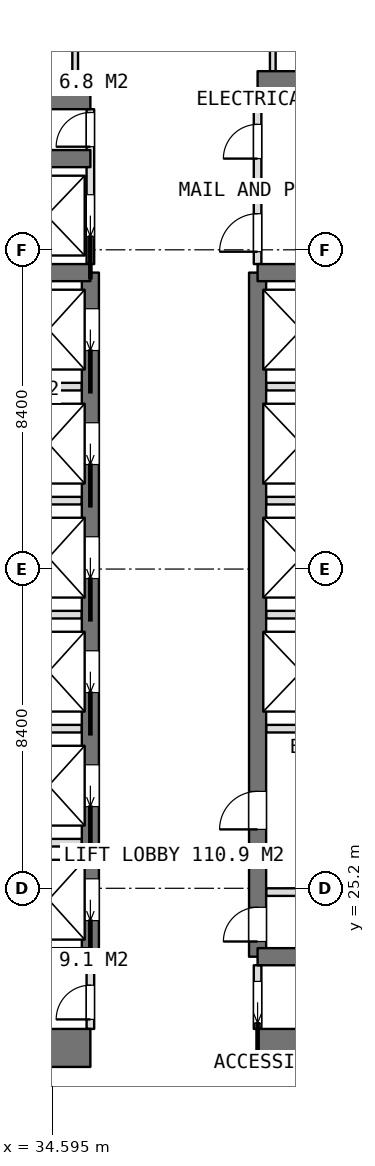
"""IFC4 building model, lengths in metres.
Left out: names, types, materials, properties, quantities, classifications, styles, units other than length and angle.
Written with IfcOpenShell. Run it as: python <this file> out.ifc"""

import sys

from ifc_helpers import new_model, si_unit, direction, frame, frame_2d, origin, place, context, subcontext, project, spatial, rectangle, extrude, element, fill, save


model = new_model("IFC4")
c1 = context("Model", 3, precision=1e-05, world=origin(), true_north=direction((0.0, 1.0)))
c2 = subcontext(c1, "Body", "Model", "MODEL_VIEW")
j1 = project(units=[si_unit("LENGTHUNIT", "METRE"), si_unit("PLANEANGLEUNIT", "RADIAN")], contexts=[c1])
p1 = place(None, origin())
s1 = spatial("IfcSite", under=j1, at=p1, CompositionType="ELEMENT")
p2 = place(p1, origin())
s2 = spatial("IfcBuilding", under=s1, at=p2, CompositionType="ELEMENT")
p3 = place(p2, frame((0.0, 0.0, 117.8)))
s3 = spatial("IfcBuildingStorey", under=s2, at=p3, CompositionType="ELEMENT", Elevation=117.8)
p4 = place(p3, frame((25.2, 21.0, 0.0), z_axis=(0.0, 0.0, 1.0), x_axis=(1.0, 0.0, 0.0)))
e1 = element("IfcWall", 1, at=p4, inside=s3, PredefinedType="SHEAR", context=c2, shape_type="SweptSolid", body=[
    extrude(rectangle(XDim=10.4, YDim=1.0, at=frame_2d((5.2, 0.0))), origin(), (0.0, 0.0, 1.0), 3.75),
])
p5 = place(p3, frame((40.0, 21.0, 0.0), z_axis=(0.0, 0.0, 1.0), x_axis=(1.0, 0.0, 0.0)))
e2 = element("IfcWall", 2, at=p5, inside=s3, PredefinedType="SHEAR", context=c2, shape_type="SweptSolid", body=[
    extrude(rectangle(XDim=10.4, YDim=1.0, at=frame_2d((5.2, 0.0))), origin(), (0.0, 0.0, 1.0), 3.75),
])
p6 = place(p3, frame((25.2, 46.2, 0.0), z_axis=(0.0, 0.0, 1.0), x_axis=(1.0, 0.0, 0.0)))
e3 = element("IfcWall", 3, at=p6, inside=s3, PredefinedType="SHEAR", context=c2, shape_type="SweptSolid", body=[
    extrude(rectangle(XDim=10.4, YDim=1.0, at=frame_2d((5.2, 0.0))), origin(), (0.0, 0.0, 1.0), 3.75),
])
p7 = place(p3, frame((40.0, 46.2, 0.0), z_axis=(0.0, 0.0, 1.0), x_axis=(1.0, 0.0, 0.0)))
e4 = element("IfcWall", 4, at=p7, inside=s3, PredefinedType="SHEAR", context=c2, shape_type="SweptSolid", body=[
    extrude(rectangle(XDim=10.4, YDim=1.0, at=frame_2d((5.2, 0.0))), origin(), (0.0, 0.0, 1.0), 3.75),
])
p8 = place(p3, frame((35.6, 23.4, 0.0), z_axis=(0.0, 0.0, 1.0), x_axis=(0.0, 1.0, 0.0)))
e5 = element("IfcWall", 5, at=p8, inside=s3, PredefinedType="SHEAR", context=c2, shape_type="SweptSolid", body=[
    extrude(rectangle(XDim=18.0, YDim=0.45, at=frame_2d((9.0, 0.0))), origin(), (0.0, 0.0, 1.0), 3.75),
])
p9 = place(p8, frame((0.95, 0.0, 0.0)))
e6 = element("IfcOpeningElement", 6, at=p9, cuts=e5, PredefinedType="OPENING", context=c2, shape_type="SweptSolid", body=[
    extrude(rectangle(XDim=1.1, YDim=2.1, at=frame_2d((0.55, 1.05))), frame((0.0, 0.235, 0.0), z_axis=(0.0, -1.0, 0.0), x_axis=(1.0, 0.0, 0.0)), (0.0, 0.0, 1.0), 0.47),
])
p10 = place(p8, frame((3.95, 0.0, 0.0)))
e7 = element("IfcOpeningElement", 7, at=p10, cuts=e5, PredefinedType="OPENING", context=c2, shape_type="SweptSolid", body=[
    extrude(rectangle(XDim=1.1, YDim=2.1, at=frame_2d((0.55, 1.05))), frame((0.0, 0.235, 0.0), z_axis=(0.0, -1.0, 0.0), x_axis=(1.0, 0.0, 0.0)), (0.0, 0.0, 1.0), 0.47),
])
p11 = place(p8, frame((6.95, 0.0, 0.0)))
e8 = element("IfcOpeningElement", 8, at=p11, cuts=e5, PredefinedType="OPENING", context=c2, shape_type="SweptSolid", body=[
    extrude(rectangle(XDim=1.1, YDim=2.1, at=frame_2d((0.55, 1.05))), frame((0.0, 0.235, 0.0), z_axis=(0.0, -1.0, 0.0), x_axis=(1.0, 0.0, 0.0)), (0.0, 0.0, 1.0), 0.47),
])
p12 = place(p8, frame((9.95, 0.0, 0.0)))
e9 = element("IfcOpeningElement", 9, at=p12, cuts=e5, PredefinedType="OPENING", context=c2, shape_type="SweptSolid", body=[
    extrude(rectangle(XDim=1.1, YDim=2.1, at=frame_2d((0.55, 1.05))), frame((0.0, 0.235, 0.0), z_axis=(0.0, -1.0, 0.0), x_axis=(1.0, 0.0, 0.0)), (0.0, 0.0, 1.0), 0.47),
])
p13 = place(p8, frame((12.95, 0.0, 0.0)))
e10 = element("IfcOpeningElement", 10, at=p13, cuts=e5, PredefinedType="OPENING", context=c2, shape_type="SweptSolid", body=[
    extrude(rectangle(XDim=1.1, YDim=2.1, at=frame_2d((0.55, 1.05))), frame((0.0, 0.235, 0.0), z_axis=(0.0, -1.0, 0.0), x_axis=(1.0, 0.0, 0.0)), (0.0, 0.0, 1.0), 0.47),
])
p14 = place(p8, frame((15.95, 0.0, 0.0)))
e11 = element("IfcOpeningElement", 11, at=p14, cuts=e5, PredefinedType="OPENING", context=c2, shape_type="SweptSolid", body=[
    extrude(rectangle(XDim=1.1, YDim=2.1, at=frame_2d((0.55, 1.05))), frame((0.0, 0.235, 0.0), z_axis=(0.0, -1.0, 0.0), x_axis=(1.0, 0.0, 0.0)), (0.0, 0.0, 1.0), 0.47),
])
p15 = place(p3, frame((40.0, 23.4, 0.0), z_axis=(0.0, 0.0, 1.0), x_axis=(0.0, 1.0, 0.0)))
e12 = element("IfcWall", 12, at=p15, inside=s3, PredefinedType="SHEAR", context=c2, shape_type="SweptSolid", body=[
    extrude(rectangle(XDim=18.0, YDim=0.45, at=frame_2d((9.0, 0.0))), origin(), (0.0, 0.0, 1.0), 3.75),
])
p16 = place(p15, frame((0.4, 0.0, 0.0)))
e13 = element("IfcOpeningElement", 13, at=p16, cuts=e12, PredefinedType="OPENING", context=c2, shape_type="SweptSolid", body=[
    extrude(rectangle(XDim=0.9, YDim=2.1, at=frame_2d((0.45, 1.05))), frame((0.0, 0.235, 0.0), z_axis=(0.0, -1.0, 0.0), x_axis=(1.0, 0.0, 0.0)), (0.0, 0.0, 1.0), 0.47),
])
p17 = place(p15, frame((3.35, 0.0, 0.0)))
e14 = element("IfcOpeningElement", 14, at=p17, cuts=e12, PredefinedType="OPENING", context=c2, shape_type="SweptSolid", body=[
    extrude(rectangle(XDim=1.0, YDim=2.1, at=frame_2d((0.5, 1.05))), frame((0.0, 0.235, 0.0), z_axis=(0.0, -1.0, 0.0), x_axis=(1.0, 0.0, 0.0)), (0.0, 0.0, 1.0), 0.47),
])
for number, where, z_axis, x_axis in (
    (15, (31.8, 23.4, 0.0), (0.0, 0.0, 1.0), (1.0, 0.0, 0.0)),
    (16, (31.8, 41.4, 0.0), (0.0, 0.0, 1.0), (1.0, 0.0, 0.0)),
    (17, (31.8, 44.4, 0.0), (0.0, 0.0, 1.0), (1.0, 0.0, 0.0)),
    (18, (40.0, 23.4, 0.0), (0.0, 0.0, 1.0), (1.0, 0.0, 0.0)),
    (19, (40.0, 41.4, 0.0), (0.0, 0.0, 1.0), (1.0, 0.0, 0.0)),
):
    element("IfcWall", number, at=place(p3, frame(where, z_axis=z_axis, x_axis=x_axis)), inside=s3, PredefinedType="SHEAR", context=c2, shape_type="SweptSolid", body=[
        extrude(rectangle(XDim=3.8, YDim=0.45, at=frame_2d((1.9, 0.0))), origin(), (0.0, 0.0, 1.0), 3.75),
    ])
for number, where, z_axis, x_axis in (
    (20, (32.025, 26.4, 0.0), (0.0, 0.0, 1.0), (1.0, 0.0, 0.0)),
    (21, (32.025, 29.4, 0.0), (0.0, 0.0, 1.0), (1.0, 0.0, 0.0)),
    (22, (32.025, 32.4, 0.0), (0.0, 0.0, 1.0), (1.0, 0.0, 0.0)),
    (23, (32.025, 35.4, 0.0), (0.0, 0.0, 1.0), (1.0, 0.0, 0.0)),
    (24, (32.025, 38.4, 0.0), (0.0, 0.0, 1.0), (1.0, 0.0, 0.0)),
):
    element("IfcWall", number, at=place(p3, frame(where, z_axis=z_axis, x_axis=x_axis)), inside=s3, PredefinedType="PARTITIONING", context=c2, shape_type="SweptSolid", body=[
        extrude(rectangle(XDim=3.35, YDim=0.2, at=frame_2d((1.675, 0.0))), origin(), (0.0, 0.0, 1.0), 3.5),
    ])
for number, where, z_axis, x_axis in (
    (25, (40.225, 29.4, 0.0), (0.0, 0.0, 1.0), (1.0, 0.0, 0.0)),
    (26, (40.225, 32.4, 0.0), (0.0, 0.0, 1.0), (1.0, 0.0, 0.0)),
    (27, (40.225, 35.4, 0.0), (0.0, 0.0, 1.0), (1.0, 0.0, 0.0)),
    (28, (40.225, 38.4, 0.0), (0.0, 0.0, 1.0), (1.0, 0.0, 0.0)),
):
    element("IfcWall", number, at=place(p3, frame(where, z_axis=z_axis, x_axis=x_axis)), inside=s3, PredefinedType="PARTITIONING", context=c2, shape_type="SweptSolid", body=[
        extrude(rectangle(XDim=3.35, YDim=0.2, at=frame_2d((1.675, 0.0))), origin(), (0.0, 0.0, 1.0), 3.5),
    ])
p18 = place(p3, frame((40.0, 21.5, 0.0), z_axis=(0.0, 0.0, 1.0), x_axis=(0.0, 1.0, 0.0)))
e29 = element("IfcWall", 29, at=p18, inside=s3, PredefinedType="PARTITIONING", context=c2, shape_type="SweptSolid", body=[
    extrude(rectangle(XDim=1.675, YDim=0.2, at=frame_2d((0.837, 0.0))), origin(), (0.0, 0.0, 1.0), 3.5),
])
p19 = place(p18, frame((0.15, 0.0, 0.0)))
e30 = element("IfcOpeningElement", 30, at=p19, cuts=e29, PredefinedType="OPENING", context=c2, shape_type="SweptSolid", body=[
    extrude(rectangle(XDim=1.1, YDim=2.1, at=frame_2d((0.55, 1.05))), frame((0.0, 0.11, 0.0), z_axis=(0.0, -1.0, 0.0), x_axis=(1.0, 0.0, 0.0)), (0.0, 0.0, 1.0), 0.22),
])
p20 = place(p3, frame((40.0, 41.625, 0.0), z_axis=(0.0, 0.0, 1.0), x_axis=(0.0, 1.0, 0.0)))
e31 = element("IfcWall", 31, at=p20, inside=s3, PredefinedType="PARTITIONING", context=c2, shape_type="SweptSolid", body=[
    extrude(rectangle(XDim=4.075, YDim=0.2, at=frame_2d((2.038, 0.0))), origin(), (0.0, 0.0, 1.0), 3.5),
])
p21 = place(p20, frame((2.775, 0.0, 0.0)))
e32 = element("IfcOpeningElement", 32, at=p21, cuts=e31, PredefinedType="OPENING", context=c2, shape_type="SweptSolid", body=[
    extrude(rectangle(XDim=0.9, YDim=2.1, at=frame_2d((0.45, 1.05))), frame((0.0, 0.11, 0.0), z_axis=(0.0, -1.0, 0.0), x_axis=(1.0, 0.0, 0.0)), (0.0, 0.0, 1.0), 0.22),
])
p22 = place(p20, frame((0.325, 0.0, 0.0)))
e33 = element("IfcOpeningElement", 33, at=p22, cuts=e31, PredefinedType="OPENING", context=c2, shape_type="SweptSolid", body=[
    extrude(rectangle(XDim=1.0, YDim=2.1, at=frame_2d((0.5, 1.05))), frame((0.0, 0.11, 0.0), z_axis=(0.0, -1.0, 0.0), x_axis=(1.0, 0.0, 0.0)), (0.0, 0.0, 1.0), 0.22),
])
p23 = place(p3, frame((35.6, 41.625, 0.0), z_axis=(0.0, 0.0, 1.0), x_axis=(0.0, 1.0, 0.0)))
e34 = element("IfcWall", 34, at=p23, inside=s3, PredefinedType="PARTITIONING", context=c2, shape_type="SweptSolid", body=[
    extrude(rectangle(XDim=4.075, YDim=0.2, at=frame_2d((2.038, 0.0))), origin(), (0.0, 0.0, 1.0), 3.5),
])
p24 = place(p23, frame((3.088, 0.0, 0.0)))
e35 = element("IfcOpeningElement", 35, at=p24, cuts=e34, PredefinedType="OPENING", context=c2, shape_type="SweptSolid", body=[
    extrude(rectangle(XDim=0.9, YDim=2.1, at=frame_2d((0.45, 1.05))), frame((0.0, 0.11, 0.0), z_axis=(0.0, -1.0, 0.0), x_axis=(1.0, 0.0, 0.0)), (0.0, 0.0, 1.0), 0.22),
])
p25 = place(p23, frame((0.725, 0.0, 0.0)))
e36 = element("IfcOpeningElement", 36, at=p25, cuts=e34, PredefinedType="OPENING", context=c2, shape_type="SweptSolid", body=[
    extrude(rectangle(XDim=1.1, YDim=2.1, at=frame_2d((0.55, 1.05))), frame((0.0, 0.11, 0.0), z_axis=(0.0, -1.0, 0.0), x_axis=(1.0, 0.0, 0.0)), (0.0, 0.0, 1.0), 0.22),
])
p26 = place(p3, frame((35.6, 21.5, 0.0), z_axis=(0.0, 0.0, 1.0), x_axis=(0.0, 1.0, 0.0)))
e37 = element("IfcWall", 37, at=p26, inside=s3, PredefinedType="PARTITIONING", context=c2, shape_type="SweptSolid", body=[
    extrude(rectangle(XDim=1.675, YDim=0.2, at=frame_2d((0.837, 0.0))), origin(), (0.0, 0.0, 1.0), 3.5),
])
p27 = place(p26, frame((0.25, 0.0, 0.0)))
e38 = element("IfcOpeningElement", 38, at=p27, cuts=e37, PredefinedType="OPENING", context=c2, shape_type="SweptSolid", body=[
    extrude(rectangle(XDim=0.9, YDim=2.1, at=frame_2d((0.45, 1.05))), frame((0.0, 0.11, 0.0), z_axis=(0.0, -1.0, 0.0), x_axis=(1.0, 0.0, 0.0)), (0.0, 0.0, 1.0), 0.22),
])
p28 = place(p3, frame((40.225, 25.1, 0.0), z_axis=(0.0, 0.0, 1.0), x_axis=(1.0, 0.0, 0.0)))
e39 = element("IfcWall", 39, at=p28, inside=s3, PredefinedType="PARTITIONING", context=c2, shape_type="SweptSolid", body=[
    extrude(rectangle(XDim=3.35, YDim=0.2, at=frame_2d((1.675, 0.0))), origin(), (0.0, 0.0, 1.0), 3.5),
])
p29 = place(p3, frame((40.0, 43.5, 0.0), z_axis=(0.0, 0.0, 1.0), x_axis=(1.0, 0.0, 0.0)))
e40 = element("IfcWall", 40, at=p29, inside=s3, PredefinedType="PARTITIONING", context=c2, shape_type="SweptSolid", body=[
    extrude(rectangle(XDim=3.575, YDim=0.2, at=frame_2d((1.788, 0.0))), origin(), (0.0, 0.0, 1.0), 3.5),
])
for number, where, z_axis, x_axis in (
    (41, (40.4, 46.7, 0.0), (0.0, 0.0, 1.0), (0.0, 1.0, 0.0)),
    (42, (35.2, 46.7, 0.0), (0.0, 0.0, 1.0), (0.0, 1.0, 0.0)),
):
    element("IfcWall", number, at=place(p3, frame(where, z_axis=z_axis, x_axis=x_axis)), inside=s3, PredefinedType="PARTITIONING", context=c2, shape_type="SweptSolid", body=[
        extrude(rectangle(XDim=2.625, YDim=0.15, at=frame_2d((1.312, 0.0))), origin(), (0.0, 0.0, 1.0), 3.5),
    ])
p30 = place(p19, origin())
e43 = element("IfcDoor", 43, at=p30, inside=s3, OperationType="SLIDING_TO_LEFT", PredefinedType="DOOR", context=c2, shape_type="SweptSolid", body=[
    extrude(rectangle(XDim=1.1, YDim=2.1, at=frame_2d((0.55, 1.05))), frame((0.0, 0.025, 0.0), z_axis=(0.0, -1.0, 0.0), x_axis=(1.0, 0.0, 0.0)), (0.0, 0.0, 1.0), 0.05),
])
fill(e30, e43)
p31 = place(p27, origin())
e44 = element("IfcDoor", 44, at=p31, inside=s3, OperationType="SINGLE_SWING_LEFT", PredefinedType="DOOR", context=c2, shape_type="SweptSolid", body=[
    extrude(rectangle(XDim=0.9, YDim=2.1, at=frame_2d((0.45, 1.05))), frame((0.0, 0.025, 0.0), z_axis=(0.0, -1.0, 0.0), x_axis=(1.0, 0.0, 0.0)), (0.0, 0.0, 1.0), 0.05),
])
fill(e38, e44)
p32 = place(p21, origin())
e45 = element("IfcDoor", 45, at=p32, inside=s3, OperationType="SINGLE_SWING_LEFT", PredefinedType="DOOR", context=c2, shape_type="SweptSolid", body=[
    extrude(rectangle(XDim=0.9, YDim=2.1, at=frame_2d((0.45, 1.05))), frame((0.0, 0.025, 0.0), z_axis=(0.0, -1.0, 0.0), x_axis=(1.0, 0.0, 0.0)), (0.0, 0.0, 1.0), 0.05),
])
fill(e32, e45)
p33 = place(p22, origin())
e46 = element("IfcDoor", 46, at=p33, inside=s3, OperationType="SINGLE_SWING_LEFT", PredefinedType="DOOR", context=c2, shape_type="SweptSolid", body=[
    extrude(rectangle(XDim=1.0, YDim=2.1, at=frame_2d((0.5, 1.05))), frame((0.0, 0.025, 0.0), z_axis=(0.0, -1.0, 0.0), x_axis=(1.0, 0.0, 0.0)), (0.0, 0.0, 1.0), 0.05),
])
fill(e33, e46)
p34 = place(p16, origin())
e47 = element("IfcDoor", 47, at=p34, inside=s3, OperationType="SINGLE_SWING_LEFT", PredefinedType="DOOR", context=c2, shape_type="SweptSolid", body=[
    extrude(rectangle(XDim=0.9, YDim=2.1, at=frame_2d((0.45, 1.05))), frame((0.0, 0.025, 0.0), z_axis=(0.0, -1.0, 0.0), x_axis=(1.0, 0.0, 0.0)), (0.0, 0.0, 1.0), 0.05),
])
fill(e13, e47)
p35 = place(p17, origin())
e48 = element("IfcDoor", 48, at=p35, inside=s3, OperationType="SINGLE_SWING_LEFT", PredefinedType="DOOR", context=c2, shape_type="SweptSolid", body=[
    extrude(rectangle(XDim=1.0, YDim=2.1, at=frame_2d((0.5, 1.05))), frame((0.0, 0.025, 0.0), z_axis=(0.0, -1.0, 0.0), x_axis=(1.0, 0.0, 0.0)), (0.0, 0.0, 1.0), 0.05),
])
fill(e14, e48)
p36 = place(p24, origin())
e49 = element("IfcDoor", 49, at=p36, inside=s3, OperationType="SINGLE_SWING_LEFT", PredefinedType="DOOR", context=c2, shape_type="SweptSolid", body=[
    extrude(rectangle(XDim=0.9, YDim=2.1, at=frame_2d((0.45, 1.05))), frame((0.0, 0.025, 0.0), z_axis=(0.0, -1.0, 0.0), x_axis=(1.0, 0.0, 0.0)), (0.0, 0.0, 1.0), 0.05),
])
fill(e35, e49)
p37 = place(p9, origin())
e50 = element("IfcDoor", 50, at=p37, inside=s3, OperationType="SLIDING_TO_LEFT", PredefinedType="USERDEFINED", context=c2, shape_type="SweptSolid", body=[
    extrude(rectangle(XDim=1.1, YDim=2.1, at=frame_2d((0.55, 1.05))), frame((0.0, 0.025, 0.0), z_axis=(0.0, -1.0, 0.0), x_axis=(1.0, 0.0, 0.0)), (0.0, 0.0, 1.0), 0.05),
])
fill(e6, e50)
p38 = place(p10, origin())
e51 = element("IfcDoor", 51, at=p38, inside=s3, OperationType="SLIDING_TO_LEFT", PredefinedType="USERDEFINED", context=c2, shape_type="SweptSolid", body=[
    extrude(rectangle(XDim=1.1, YDim=2.1, at=frame_2d((0.55, 1.05))), frame((0.0, 0.025, 0.0), z_axis=(0.0, -1.0, 0.0), x_axis=(1.0, 0.0, 0.0)), (0.0, 0.0, 1.0), 0.05),
])
fill(e7, e51)
p39 = place(p11, origin())
e52 = element("IfcDoor", 52, at=p39, inside=s3, OperationType="SLIDING_TO_LEFT", PredefinedType="USERDEFINED", context=c2, shape_type="SweptSolid", body=[
    extrude(rectangle(XDim=1.1, YDim=2.1, at=frame_2d((0.55, 1.05))), frame((0.0, 0.025, 0.0), z_axis=(0.0, -1.0, 0.0), x_axis=(1.0, 0.0, 0.0)), (0.0, 0.0, 1.0), 0.05),
])
fill(e8, e52)
p40 = place(p12, origin())
e53 = element("IfcDoor", 53, at=p40, inside=s3, OperationType="SLIDING_TO_LEFT", PredefinedType="USERDEFINED", context=c2, shape_type="SweptSolid", body=[
    extrude(rectangle(XDim=1.1, YDim=2.1, at=frame_2d((0.55, 1.05))), frame((0.0, 0.025, 0.0), z_axis=(0.0, -1.0, 0.0), x_axis=(1.0, 0.0, 0.0)), (0.0, 0.0, 1.0), 0.05),
])
fill(e9, e53)
p41 = place(p13, origin())
e54 = element("IfcDoor", 54, at=p41, inside=s3, OperationType="SLIDING_TO_LEFT", PredefinedType="USERDEFINED", context=c2, shape_type="SweptSolid", body=[
    extrude(rectangle(XDim=1.1, YDim=2.1, at=frame_2d((0.55, 1.05))), frame((0.0, 0.025, 0.0), z_axis=(0.0, -1.0, 0.0), x_axis=(1.0, 0.0, 0.0)), (0.0, 0.0, 1.0), 0.05),
])
fill(e10, e54)
p42 = place(p14, origin())
e55 = element("IfcDoor", 55, at=p42, inside=s3, OperationType="SLIDING_TO_LEFT", PredefinedType="USERDEFINED", context=c2, shape_type="SweptSolid", body=[
    extrude(rectangle(XDim=1.1, YDim=2.1, at=frame_2d((0.55, 1.05))), frame((0.0, 0.025, 0.0), z_axis=(0.0, -1.0, 0.0), x_axis=(1.0, 0.0, 0.0)), (0.0, 0.0, 1.0), 0.05),
])
fill(e11, e55)
p43 = place(p25, origin())
e56 = element("IfcDoor", 56, at=p43, inside=s3, OperationType="SLIDING_TO_LEFT", PredefinedType="USERDEFINED", context=c2, shape_type="SweptSolid", body=[
    extrude(rectangle(XDim=1.1, YDim=2.1, at=frame_2d((0.55, 1.05))), frame((0.0, 0.025, 0.0), z_axis=(0.0, -1.0, 0.0), x_axis=(1.0, 0.0, 0.0)), (0.0, 0.0, 1.0), 0.05),
])
fill(e36, e56)
save(model, sys.argv[1])
